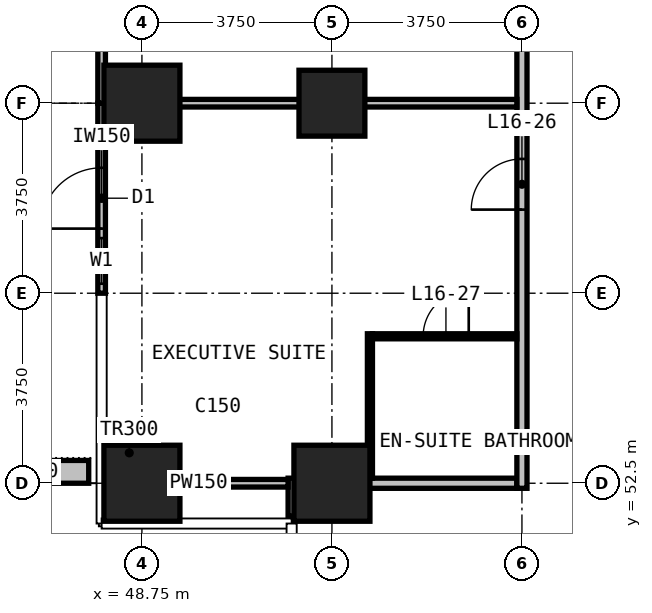
"""IFC4 building model, lengths in metres.
Left out: names, types, materials, properties, quantities, classifications, styles, units other than length and angle.
Written with IfcOpenShell. Run it as: python <this file> out.ifc"""

import sys

from ifc_helpers import new_model, si_unit, direction, frame, frame_2d, origin, origin_2d, place, context, subcontext, project, spatial, rectangle, extrude, element, fill, save


model = new_model("IFC4")
c1 = context("Model", 3, precision=1e-05, world=origin(), true_north=direction((0.0, 1.0)))
c2 = subcontext(c1, "Body", "Model", "MODEL_VIEW")
j1 = project(units=[si_unit("LENGTHUNIT", "METRE"), si_unit("PLANEANGLEUNIT", "RADIAN")], contexts=[c1])
p1 = place(None, origin())
s1 = spatial("IfcSite", under=j1, at=p1, CompositionType="ELEMENT")
p2 = place(p1, origin())
s2 = spatial("IfcBuilding", under=s1, at=p2, CompositionType="ELEMENT")
p3 = place(p2, frame((0.0, 0.0, 72.5)))
s3 = spatial("IfcBuildingStorey", under=s2, at=p3, CompositionType="ELEMENT", Elevation=72.5)
for number, where, z_axis, x_axis in (
    (1, (48.75, 52.5, 0.0), (0.0, 0.0, 1.0), (1.0, 0.0, 0.0)),
    (2, (48.75, 60.0, 0.0), (0.0, 0.0, 1.0), (1.0, 0.0, 0.0)),
    (3, (52.5, 52.5, 0.0), (0.0, 0.0, 1.0), (1.0, 0.0, 0.0)),
):
    element("IfcColumn", number, at=place(p3, frame(where, z_axis=z_axis, x_axis=x_axis)), inside=s3, PredefinedType="COLUMN", context=c2, shape_type="SweptSolid", body=[
        extrude(rectangle(XDim=1.5, YDim=1.5, at=origin_2d()), origin(), (0.0, 0.0, 1.0), 3.3),
    ])
p4 = place(p3, frame((52.5, 60.0, 0.0), z_axis=(0.0, 0.0, 1.0), x_axis=(1.0, 0.0, 0.0)))
e4 = element("IfcColumn", 4, at=p4, inside=s3, PredefinedType="COLUMN", context=c2, shape_type="SweptSolid", body=[
    extrude(rectangle(XDim=1.3, YDim=1.3, at=origin_2d()), origin(), (0.0, 0.0, 1.0), 3.3),
])
p5 = place(p3, frame((47.955, 56.25, 0.0), z_axis=(0.0, 0.0, 1.0), x_axis=(0.0, 1.0, 0.0)))
e5 = element("IfcWall", 5, at=p5, inside=s3, PredefinedType="SOLIDWALL", context=c2, shape_type="SweptSolid", body=[
    extrude(rectangle(XDim=3.75, YDim=0.15, at=frame_2d((1.875, 0.0))), origin(), (0.0, 0.0, 1.0), 3.0),
])
p6 = place(p5, frame((0.188, 0.0, 0.1)))
e6 = element("IfcOpeningElement", 6, at=p6, cuts=e5, PredefinedType="OPENING", context=c2, shape_type="SweptSolid", body=[
    extrude(rectangle(XDim=0.9, YDim=2.4, at=frame_2d((0.45, 1.2))), frame((0.0, 0.085, 0.0), z_axis=(0.0, -1.0, 0.0), x_axis=(1.0, 0.0, 0.0)), (0.0, 0.0, 1.0), 0.17),
])
p7 = place(p5, frame((1.275, 0.0, 0.0)))
e7 = element("IfcOpeningElement", 7, at=p7, cuts=e5, PredefinedType="OPENING", context=c2, shape_type="SweptSolid", body=[
    extrude(rectangle(XDim=1.2, YDim=2.4, at=frame_2d((0.6, 1.2))), frame((0.0, 0.085, 0.0), z_axis=(0.0, -1.0, 0.0), x_axis=(1.0, 0.0, 0.0)), (0.0, 0.0, 1.0), 0.17),
])
p8 = place(p3, frame((47.955, 60.0, 0.0), z_axis=(0.0, 0.0, 1.0), x_axis=(0.0, 1.0, 0.0)))
e8 = element("IfcWall", 8, at=p8, inside=s3, PredefinedType="SOLIDWALL", context=c2, shape_type="SweptSolid", body=[
    extrude(rectangle(XDim=3.75, YDim=0.15, at=frame_2d((1.875, 0.0))), origin(), (0.0, 0.0, 1.0), 3.0),
])
p9 = place(p8, frame((1.275, 0.0, 0.0)))
e9 = element("IfcOpeningElement", 9, at=p9, cuts=e8, PredefinedType="OPENING", context=c2, shape_type="SweptSolid", body=[
    extrude(rectangle(XDim=1.2, YDim=2.4, at=frame_2d((0.6, 1.2))), frame((0.0, 0.085, 0.0), z_axis=(0.0, -1.0, 0.0), x_axis=(1.0, 0.0, 0.0)), (0.0, 0.0, 1.0), 0.17),
])
p10 = place(p8, frame((2.663, 0.0, 0.1)))
e10 = element("IfcOpeningElement", 10, at=p10, cuts=e8, PredefinedType="OPENING", context=c2, shape_type="SweptSolid", body=[
    extrude(rectangle(XDim=0.9, YDim=2.4, at=frame_2d((0.45, 1.2))), frame((0.0, 0.085, 0.0), z_axis=(0.0, -1.0, 0.0), x_axis=(1.0, 0.0, 0.0)), (0.0, 0.0, 1.0), 0.17),
])
p11 = place(p3, frame((47.7, 52.725, 0.0), z_axis=(0.0, 0.0, 1.0), x_axis=(-1.0, 0.0, 0.0)))
e11 = element("IfcWall", 11, at=p11, inside=s3, PredefinedType="USERDEFINED", context=c2, shape_type="SweptSolid", body=[
    extrude(rectangle(XDim=2.35, YDim=0.45, at=frame_2d((1.175, 0.0))), origin(), (0.0, 0.0, 1.0), 1.1),
])
p12 = place(p3, frame((51.835, 52.5, 0.0), z_axis=(0.0, 0.0, 1.0), x_axis=(1.0, 0.0, 0.0)))
e12 = element("IfcWall", 12, at=p12, inside=s3, PredefinedType="PARTITIONING", context=c2, shape_type="SweptSolid", body=[
    extrude(rectangle(XDim=4.315, YDim=0.2, at=frame_2d((2.157, 0.0))), origin(), (0.0, 0.0, 1.0), 3.0),
])
p13 = place(p3, frame((51.735, 51.855, 0.0), z_axis=(0.0, 0.0, 1.0), x_axis=(0.0, 1.0, 0.0)))
e13 = element("IfcWall", 13, at=p13, inside=s3, PredefinedType="PARTITIONING", context=c2, shape_type="SweptSolid", body=[
    extrude(rectangle(XDim=0.745, YDim=0.2, at=frame_2d((0.373, 0.0))), origin(), (0.0, 0.0, 1.0), 3.0),
])
p14 = place(p3, frame((56.25, 52.4, 0.0), z_axis=(0.0, 0.0, 1.0), x_axis=(0.0, 1.0, 0.0)))
e14 = element("IfcWall", 14, at=p14, inside=s3, PredefinedType="PARTITIONING", context=c2, shape_type="SweptSolid", body=[
    extrude(rectangle(XDim=37.675, YDim=0.2, at=frame_2d((18.837, 0.0))), origin(), (0.0, 0.0, 1.0), 3.0),
])
p15 = place(p14, frame((5.5, 0.0, 0.0)))
e15 = element("IfcOpeningElement", 15, at=p15, cuts=e14, PredefinedType="OPENING", context=c2, shape_type="SweptSolid", body=[
    extrude(rectangle(XDim=1.0, YDim=2.2, at=frame_2d((0.5, 1.1))), frame((0.0, 0.11, 0.0), z_axis=(0.0, -1.0, 0.0), x_axis=(1.0, 0.0, 0.0)), (0.0, 0.0, 1.0), 0.22),
])
p16 = place(p14, frame((8.7, 0.0, 0.0)))
e16 = element("IfcOpeningElement", 16, at=p16, cuts=e14, PredefinedType="OPENING", context=c2, shape_type="SweptSolid", body=[
    extrude(rectangle(XDim=1.0, YDim=2.2, at=frame_2d((0.5, 1.1))), frame((0.0, 0.11, 0.0), z_axis=(0.0, -1.0, 0.0), x_axis=(1.0, 0.0, 0.0)), (0.0, 0.0, 1.0), 0.22),
])
p17 = place(p14, frame((20.5, 0.0, 0.0)))
e17 = element("IfcOpeningElement", 17, at=p17, cuts=e14, PredefinedType="OPENING", context=c2, shape_type="SweptSolid", body=[
    extrude(rectangle(XDim=1.0, YDim=2.2, at=frame_2d((0.5, 1.1))), frame((0.0, 0.11, 0.0), z_axis=(0.0, -1.0, 0.0), x_axis=(1.0, 0.0, 0.0)), (0.0, 0.0, 1.0), 0.22),
])
p18 = place(p14, frame((23.7, 0.0, 0.0)))
e18 = element("IfcOpeningElement", 18, at=p18, cuts=e14, PredefinedType="OPENING", context=c2, shape_type="SweptSolid", body=[
    extrude(rectangle(XDim=1.0, YDim=2.2, at=frame_2d((0.5, 1.1))), frame((0.0, 0.11, 0.0), z_axis=(0.0, -1.0, 0.0), x_axis=(1.0, 0.0, 0.0)), (0.0, 0.0, 1.0), 0.22),
])
p19 = place(p14, frame((35.5, 0.0, 0.0)))
e19 = element("IfcOpeningElement", 19, at=p19, cuts=e14, PredefinedType="OPENING", context=c2, shape_type="SweptSolid", body=[
    extrude(rectangle(XDim=1.0, YDim=2.2, at=frame_2d((0.5, 1.1))), frame((0.0, 0.11, 0.0), z_axis=(0.0, -1.0, 0.0), x_axis=(1.0, 0.0, 0.0)), (0.0, 0.0, 1.0), 0.22),
])
p20 = place(p3, frame((48.105, 52.5, 0.0), z_axis=(0.0, 0.0, 1.0), x_axis=(1.0, 0.0, 0.0)))
e20 = element("IfcWall", 20, at=p20, inside=s3, PredefinedType="PARTITIONING", context=c2, shape_type="SweptSolid", body=[
    extrude(rectangle(XDim=3.53, YDim=0.15, at=frame_2d((1.765, 0.0))), origin(), (0.0, 0.0, 1.0), 3.0),
])
p21 = place(p3, frame((48.04, 60.0, 0.0), z_axis=(0.0, 0.0, 1.0), x_axis=(1.0, 0.0, 0.0)))
e21 = element("IfcWall", 21, at=p21, inside=s3, PredefinedType="PARTITIONING", context=c2, shape_type="SweptSolid", body=[
    extrude(rectangle(XDim=8.11, YDim=0.15, at=frame_2d((4.055, 0.0))), origin(), (0.0, 0.0, 1.0), 3.0),
])
p22 = place(p3, frame((53.3, 55.4, 0.0), z_axis=(0.0, 0.0, 1.0), x_axis=(1.0, 0.0, 0.0)))
e22 = element("IfcWall", 22, at=p22, inside=s3, PredefinedType="PARTITIONING", context=c2, shape_type="SweptSolid", body=[
    extrude(rectangle(XDim=2.85, YDim=0.1, at=frame_2d((1.425, 0.0))), origin(), (0.0, 0.0, 1.0), 3.0),
])
p23 = place(p22, frame((1.0, 0.0, 0.0)))
e23 = element("IfcOpeningElement", 23, at=p23, cuts=e22, PredefinedType="OPENING", context=c2, shape_type="SweptSolid", body=[
    extrude(rectangle(XDim=0.9, YDim=2.2, at=frame_2d((0.45, 1.1))), frame((0.0, 0.06, 0.0), z_axis=(0.0, -1.0, 0.0), x_axis=(1.0, 0.0, 0.0)), (0.0, 0.0, 1.0), 0.12),
])
p24 = place(p3, frame((53.25, 52.6, 0.0), z_axis=(0.0, 0.0, 1.0), x_axis=(0.0, 1.0, 0.0)))
e24 = element("IfcWall", 24, at=p24, inside=s3, PredefinedType="PARTITIONING", context=c2, shape_type="SweptSolid", body=[
    extrude(rectangle(XDim=2.85, YDim=0.1, at=frame_2d((1.425, 0.0))), origin(), (0.0, 0.0, 1.0), 3.0),
])
p25 = place(p6, origin())
e25 = element("IfcWindow", 25, at=p25, inside=s3, PartitioningType="SINGLE_PANEL", PredefinedType="WINDOW", context=c2, shape_type="SweptSolid", body=[
    extrude(rectangle(XDim=0.9, YDim=2.4, at=frame_2d((0.45, 1.2))), frame((0.0, 0.03, 0.0), z_axis=(0.0, -1.0, 0.0), x_axis=(1.0, 0.0, 0.0)), (0.0, 0.0, 1.0), 0.06),
])
fill(e6, e25)
p26 = place(p7, origin())
e26 = element("IfcDoor", 26, at=p26, inside=s3, OperationType="SINGLE_SWING_LEFT", PredefinedType="DOOR", context=c2, shape_type="SweptSolid", body=[
    extrude(rectangle(XDim=1.2, YDim=2.4, at=frame_2d((0.6, 1.2))), frame((0.0, 0.025, 0.0), z_axis=(0.0, -1.0, 0.0), x_axis=(1.0, 0.0, 0.0)), (0.0, 0.0, 1.0), 0.05),
])
fill(e7, e26)
p27 = place(p15, origin())
e27 = element("IfcDoor", 27, at=p27, inside=s3, OperationType="SINGLE_SWING_LEFT", PredefinedType="DOOR", context=c2, shape_type="SweptSolid", body=[
    extrude(rectangle(XDim=1.0, YDim=2.2, at=frame_2d((0.5, 1.1))), frame((0.0, 0.025, 0.0), z_axis=(0.0, -1.0, 0.0), x_axis=(1.0, 0.0, 0.0)), (0.0, 0.0, 1.0), 0.05),
])
fill(e15, e27)
p28 = place(p23, origin())
e28 = element("IfcDoor", 28, at=p28, inside=s3, OperationType="SINGLE_SWING_RIGHT", PredefinedType="DOOR", context=c2, shape_type="SweptSolid", body=[
    extrude(rectangle(XDim=0.9, YDim=2.2, at=frame_2d((0.45, 1.1))), frame((0.0, 0.025, 0.0), z_axis=(0.0, -1.0, 0.0), x_axis=(1.0, 0.0, 0.0)), (0.0, 0.0, 1.0), 0.05),
])
fill(e23, e28)
save(model, sys.argv[1])
